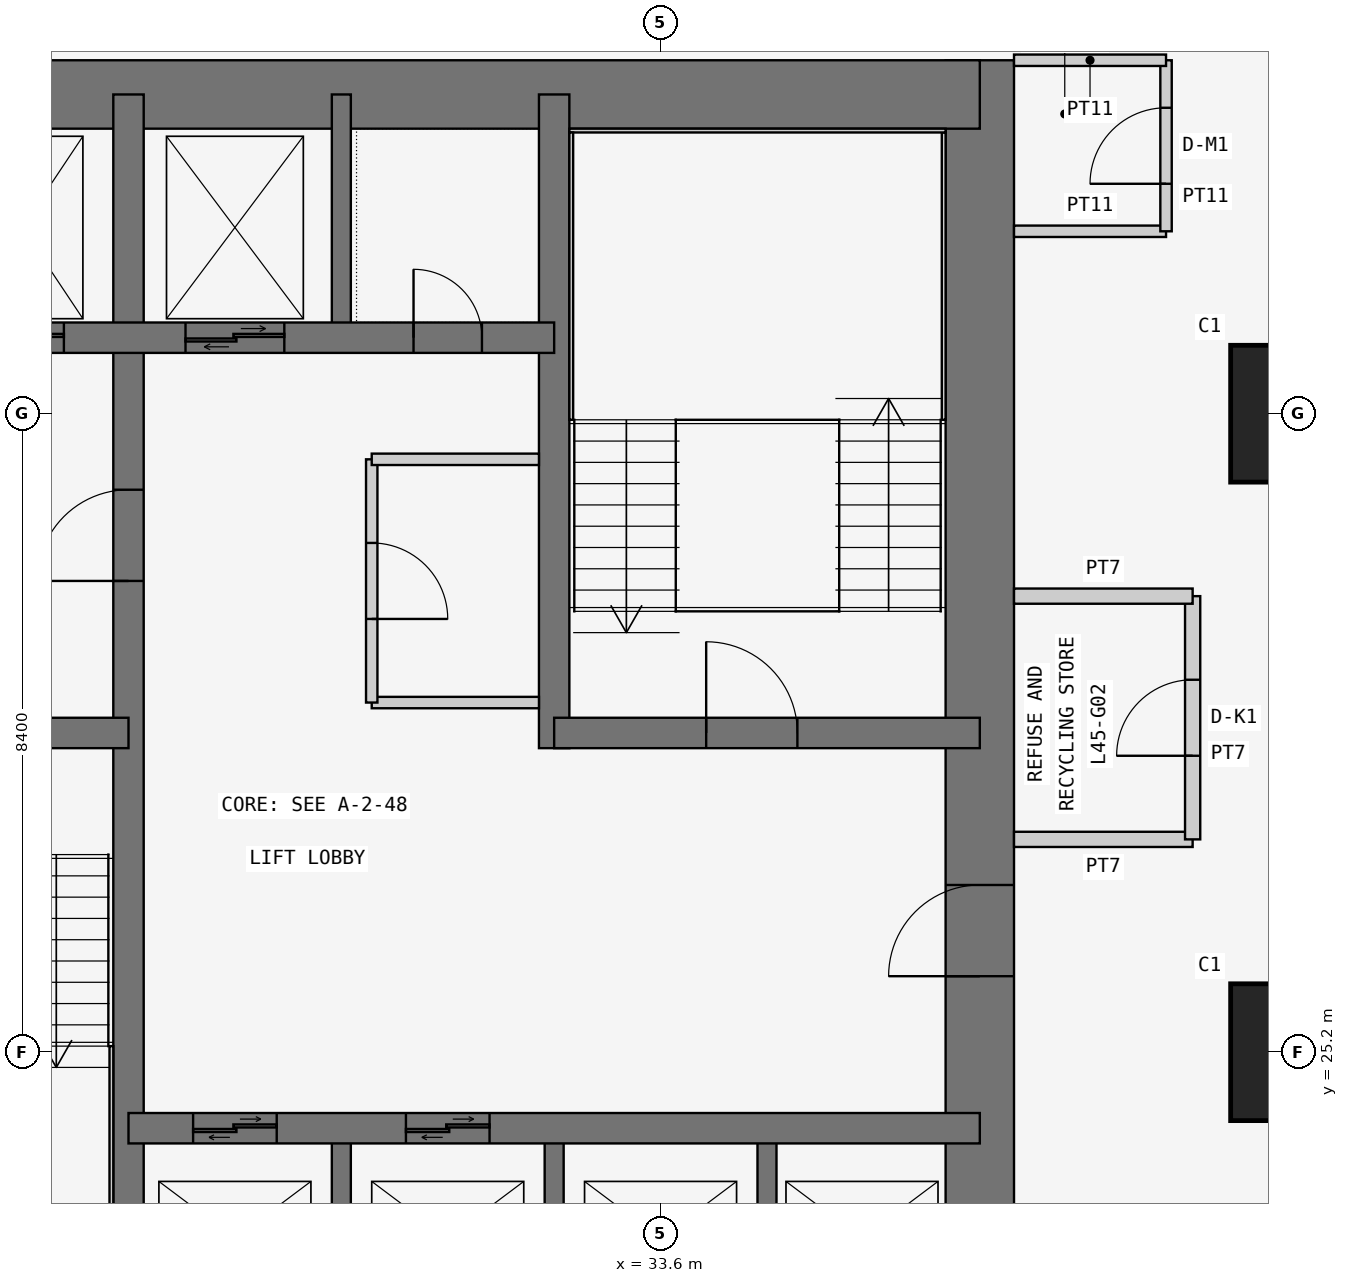
"""IFC4 building model, lengths in metres.
Left out: names, types, materials, properties, quantities, classifications, styles, units other than length and angle.
Written with IfcOpenShell. Run it as: python <this file> out.ifc"""

import sys

from ifc_helpers import new_model, si_unit, direction, frame, frame_2d, origin, origin_2d, place, context, subcontext, project, spatial, rectangle, extrude, element, fill, save


model = new_model("IFC4")
c1 = context("Model", 3, precision=1e-05, world=origin(), true_north=direction((0.0, 1.0)))
c2 = subcontext(c1, "Body", "Model", "MODEL_VIEW")
j1 = project(units=[si_unit("LENGTHUNIT", "METRE"), si_unit("PLANEANGLEUNIT", "RADIAN")], contexts=[c1])
p1 = place(None, origin())
s1 = spatial("IfcSite", under=j1, at=p1, CompositionType="ELEMENT")
p2 = place(p1, origin())
s2 = spatial("IfcBuilding", under=s1, at=p2, CompositionType="ELEMENT")
p3 = place(p2, frame((0.0, 0.0, 173.7)))
s3 = spatial("IfcBuildingStorey", under=s2, at=p3, CompositionType="ELEMENT", Elevation=173.7)
for number, where, z_axis, x_axis in (
    (1, (42.0, 25.2, 0.0), (0.0, 0.0, 1.0), (1.0, 0.0, 0.0)),
    (2, (42.0, 33.6, 0.0), (0.0, 0.0, 1.0), (1.0, 0.0, 0.0)),
):
    element("IfcColumn", number, at=place(p3, frame(where, z_axis=z_axis, x_axis=x_axis)), inside=s3, PredefinedType="COLUMN", context=c2, shape_type="SweptSolid", body=[
        extrude(rectangle(XDim=1.8, YDim=1.8, at=origin_2d()), origin(), (0.0, 0.0, 1.0), 3.6),
    ])
p4 = place(p3, frame((37.8, 21.0, 0.0), z_axis=(0.0, 0.0, 1.0), x_axis=(0.0, 1.0, 0.0)))
e3 = element("IfcWall", 3, at=p4, inside=s3, PredefinedType="SHEAR", context=c2, shape_type="SweptSolid", body=[
    extrude(rectangle(XDim=17.25, YDim=0.9, at=frame_2d((8.625, 0.0))), origin(), (0.0, 0.0, 1.0), 3.6),
])
p5 = place(p4, frame((5.2, 0.0, 0.0)))
e4 = element("IfcOpeningElement", 4, at=p5, cuts=e3, PredefinedType="OPENING", context=c2, shape_type="SweptSolid", body=[
    extrude(rectangle(XDim=1.2, YDim=2.1, at=frame_2d((0.6, 1.05))), frame((0.0, 0.46, 0.0), z_axis=(0.0, -1.0, 0.0), x_axis=(1.0, 0.0, 0.0)), (0.0, 0.0, 1.0), 0.92),
])
p6 = place(p3, frame((37.8, 37.8, 0.0), z_axis=(0.0, 0.0, 1.0), x_axis=(-1.0, 0.0, 0.0)))
e5 = element("IfcWall", 5, at=p6, inside=s3, PredefinedType="SHEAR", context=c2, shape_type="SweptSolid", body=[
    extrude(rectangle(XDim=17.25, YDim=0.9, at=frame_2d((8.625, 0.0))), origin(), (0.0, 0.0, 1.0), 3.6),
])
p7 = place(p3, frame((26.6, 21.0, 0.0), z_axis=(0.0, 0.0, 1.0), x_axis=(0.0, 1.0, 0.0)))
e6 = element("IfcWall", 6, at=p7, inside=s3, PredefinedType="SHEAR", context=c2, shape_type="SweptSolid", body=[
    extrude(rectangle(XDim=16.8, YDim=0.4, at=frame_2d((8.4, 0.0))), origin(), (0.0, 0.0, 1.0), 3.6),
])
p8 = place(p7, frame((10.4, 0.0, 0.0)))
e7 = element("IfcOpeningElement", 7, at=p8, cuts=e6, PredefinedType="OPENING", context=c2, shape_type="SweptSolid", body=[
    extrude(rectangle(XDim=1.2, YDim=2.1, at=frame_2d((0.6, 1.05))), frame((0.0, 0.21, 0.0), z_axis=(0.0, -1.0, 0.0), x_axis=(1.0, 0.0, 0.0)), (0.0, 0.0, 1.0), 0.42),
])
p9 = place(p3, frame((21.0, 29.4, 0.0), z_axis=(0.0, 0.0, 1.0), x_axis=(1.0, 0.0, 0.0)))
e8 = element("IfcWall", 8, at=p9, inside=s3, PredefinedType="SHEAR", context=c2, shape_type="SweptSolid", body=[
    extrude(rectangle(XDim=5.6, YDim=0.4, at=frame_2d((2.8, 0.0))), origin(), (0.0, 0.0, 1.0), 3.6),
])
p10 = place(p9, frame((2.3, 0.0, 0.0)))
e9 = element("IfcOpeningElement", 9, at=p10, cuts=e8, PredefinedType="OPENING", context=c2, shape_type="SweptSolid", body=[
    extrude(rectangle(XDim=1.2, YDim=2.1, at=frame_2d((0.6, 1.05))), frame((0.0, 0.21, 0.0), z_axis=(0.0, -1.0, 0.0), x_axis=(1.0, 0.0, 0.0)), (0.0, 0.0, 1.0), 0.42),
])
p11 = place(p3, frame((21.0, 34.6, 0.0), z_axis=(0.0, 0.0, 1.0), x_axis=(1.0, 0.0, 0.0)))
e10 = element("IfcWall", 10, at=p11, inside=s3, PredefinedType="SHEAR", context=c2, shape_type="SweptSolid", body=[
    extrude(rectangle(XDim=11.2, YDim=0.4, at=frame_2d((5.6, 0.0))), origin(), (0.0, 0.0, 1.0), 3.6),
])
p12 = place(p11, frame((9.35, 0.0, 0.0)))
e11 = element("IfcOpeningElement", 11, at=p12, cuts=e10, PredefinedType="OPENING", context=c2, shape_type="SweptSolid", body=[
    extrude(rectangle(XDim=0.9, YDim=2.1, at=frame_2d((0.45, 1.05))), frame((0.0, 0.21, 0.0), z_axis=(0.0, -1.0, 0.0), x_axis=(1.0, 0.0, 0.0)), (0.0, 0.0, 1.0), 0.42),
])
p13 = place(p11, frame((1.0, 0.0, 0.0)))
e12 = element("IfcOpeningElement", 12, at=p13, cuts=e10, PredefinedType="OPENING", context=c2, shape_type="SweptSolid", body=[
    extrude(rectangle(XDim=1.1, YDim=2.1, at=frame_2d((0.55, 1.05))), frame((0.0, 0.21, 0.0), z_axis=(0.0, -1.0, 0.0), x_axis=(1.0, 0.0, 0.0)), (0.0, 0.0, 1.0), 0.42),
])
p14 = place(p11, frame((3.65, 0.0, 0.0)))
e13 = element("IfcOpeningElement", 13, at=p14, cuts=e10, PredefinedType="OPENING", context=c2, shape_type="SweptSolid", body=[
    extrude(rectangle(XDim=1.1, YDim=2.1, at=frame_2d((0.55, 1.05))), frame((0.0, 0.21, 0.0), z_axis=(0.0, -1.0, 0.0), x_axis=(1.0, 0.0, 0.0)), (0.0, 0.0, 1.0), 0.42),
])
p15 = place(p11, frame((6.35, 0.0, 0.0)))
e14 = element("IfcOpeningElement", 14, at=p15, cuts=e10, PredefinedType="OPENING", context=c2, shape_type="SweptSolid", body=[
    extrude(rectangle(XDim=1.3, YDim=2.1, at=frame_2d((0.65, 1.05))), frame((0.0, 0.21, 0.0), z_axis=(0.0, -1.0, 0.0), x_axis=(1.0, 0.0, 0.0)), (0.0, 0.0, 1.0), 0.42),
])
p16 = place(p3, frame((26.6, 24.2, 0.0), z_axis=(0.0, 0.0, 1.0), x_axis=(1.0, 0.0, 0.0)))
e15 = element("IfcWall", 15, at=p16, inside=s3, PredefinedType="SHEAR", context=c2, shape_type="SweptSolid", body=[
    extrude(rectangle(XDim=11.2, YDim=0.4, at=frame_2d((5.6, 0.0))), origin(), (0.0, 0.0, 1.0), 3.6),
])
p17 = place(p16, frame((0.85, 0.0, 0.0)))
e16 = element("IfcOpeningElement", 16, at=p17, cuts=e15, PredefinedType="OPENING", context=c2, shape_type="SweptSolid", body=[
    extrude(rectangle(XDim=1.1, YDim=2.1, at=frame_2d((0.55, 1.05))), frame((0.0, 0.21, 0.0), z_axis=(0.0, -1.0, 0.0), x_axis=(1.0, 0.0, 0.0)), (0.0, 0.0, 1.0), 0.42),
])
p18 = place(p16, frame((3.65, 0.0, 0.0)))
e17 = element("IfcOpeningElement", 17, at=p18, cuts=e15, PredefinedType="OPENING", context=c2, shape_type="SweptSolid", body=[
    extrude(rectangle(XDim=1.1, YDim=2.1, at=frame_2d((0.55, 1.05))), frame((0.0, 0.21, 0.0), z_axis=(0.0, -1.0, 0.0), x_axis=(1.0, 0.0, 0.0)), (0.0, 0.0, 1.0), 0.42),
])
p19 = place(p3, frame((32.2, 29.2, 0.0), z_axis=(0.0, 0.0, 1.0), x_axis=(0.0, 1.0, 0.0)))
e18 = element("IfcWall", 18, at=p19, inside=s3, PredefinedType="SHEAR", context=c2, shape_type="SweptSolid", body=[
    extrude(rectangle(XDim=8.6, YDim=0.4, at=frame_2d((4.3, 0.0))), origin(), (0.0, 0.0, 1.0), 3.6),
])
p20 = place(p3, frame((32.2, 29.4, 0.0), z_axis=(0.0, 0.0, 1.0), x_axis=(1.0, 0.0, 0.0)))
e19 = element("IfcWall", 19, at=p20, inside=s3, PredefinedType="SHEAR", context=c2, shape_type="SweptSolid", body=[
    extrude(rectangle(XDim=5.6, YDim=0.4, at=frame_2d((2.8, 0.0))), origin(), (0.0, 0.0, 1.0), 3.6),
])
p21 = place(p20, frame((2.0, 0.0, 0.0)))
e20 = element("IfcOpeningElement", 20, at=p21, cuts=e19, PredefinedType="OPENING", context=c2, shape_type="SweptSolid", body=[
    extrude(rectangle(XDim=1.2, YDim=2.1, at=frame_2d((0.6, 1.05))), frame((0.0, 0.21, 0.0), z_axis=(0.0, -1.0, 0.0), x_axis=(1.0, 0.0, 0.0)), (0.0, 0.0, 1.0), 0.42),
])
for number, where, z_axis, x_axis in (
    (21, (29.4, 21.0, 0.0), (0.0, 0.0, 1.0), (0.0, 1.0, 0.0)),
    (22, (32.2, 21.0, 0.0), (0.0, 0.0, 1.0), (0.0, 1.0, 0.0)),
    (23, (35.0, 21.0, 0.0), (0.0, 0.0, 1.0), (0.0, 1.0, 0.0)),
    (24, (29.4, 34.6, 0.0), (0.0, 0.0, 1.0), (0.0, 1.0, 0.0)),
):
    element("IfcWall", number, at=place(p3, frame(where, z_axis=z_axis, x_axis=x_axis)), inside=s3, PredefinedType="SHEAR", context=c2, shape_type="SweptSolid", body=[
        extrude(rectangle(XDim=3.2, YDim=0.25, at=frame_2d((1.6, 0.0))), origin(), (0.0, 0.0, 1.0), 3.6),
    ])
p22 = place(p3, frame((38.25, 28.0, 0.0), z_axis=(0.0, 0.0, 1.0), x_axis=(1.0, 0.0, 0.0)))
e25 = element("IfcWall", 25, at=p22, inside=s3, PredefinedType="PARTITIONING", context=c2, shape_type="SweptSolid", body=[
    extrude(rectangle(XDim=2.35, YDim=0.2, at=frame_2d((1.175, 0.0))), origin(), (0.0, 0.0, 1.0), 3.35),
])
p23 = place(p3, frame((40.6, 28.0, 0.0), z_axis=(0.0, 0.0, 1.0), x_axis=(0.0, 1.0, 0.0)))
e26 = element("IfcWall", 26, at=p23, inside=s3, PredefinedType="PARTITIONING", context=c2, shape_type="SweptSolid", body=[
    extrude(rectangle(XDim=3.2, YDim=0.2, at=frame_2d((1.6, 0.0))), origin(), (0.0, 0.0, 1.0), 3.35),
])
p24 = place(p23, frame((1.1, 0.0, 0.0)))
e27 = element("IfcOpeningElement", 27, at=p24, cuts=e26, PredefinedType="OPENING", context=c2, shape_type="SweptSolid", body=[
    extrude(rectangle(XDim=1.0, YDim=2.1, at=frame_2d((0.5, 1.05))), frame((0.0, 0.11, 0.0), z_axis=(0.0, -1.0, 0.0), x_axis=(1.0, 0.0, 0.0)), (0.0, 0.0, 1.0), 0.22),
])
p25 = place(p3, frame((40.6, 31.2, 0.0), z_axis=(0.0, 0.0, 1.0), x_axis=(-1.0, 0.0, 0.0)))
e28 = element("IfcWall", 28, at=p25, inside=s3, PredefinedType="PARTITIONING", context=c2, shape_type="SweptSolid", body=[
    extrude(rectangle(XDim=2.35, YDim=0.2, at=frame_2d((1.175, 0.0))), origin(), (0.0, 0.0, 1.0), 3.35),
])
p26 = place(p3, frame((38.25, 36.0, 0.0), z_axis=(0.0, 0.0, 1.0), x_axis=(1.0, 0.0, 0.0)))
e29 = element("IfcWall", 29, at=p26, inside=s3, PredefinedType="PARTITIONING", context=c2, shape_type="SweptSolid", body=[
    extrude(rectangle(XDim=2.0, YDim=0.15, at=frame_2d((1.0, 0.0))), origin(), (0.0, 0.0, 1.0), 3.35),
])
p27 = place(p3, frame((40.25, 36.0, 0.0), z_axis=(0.0, 0.0, 1.0), x_axis=(0.0, 1.0, 0.0)))
e30 = element("IfcWall", 30, at=p27, inside=s3, PredefinedType="PARTITIONING", context=c2, shape_type="SweptSolid", body=[
    extrude(rectangle(XDim=2.25, YDim=0.15, at=frame_2d((1.125, 0.0))), origin(), (0.0, 0.0, 1.0), 3.35),
])
p28 = place(p27, frame((0.625, 0.0, 0.0)))
e31 = element("IfcOpeningElement", 31, at=p28, cuts=e30, PredefinedType="OPENING", context=c2, shape_type="SweptSolid", body=[
    extrude(rectangle(XDim=1.0, YDim=2.1, at=frame_2d((0.5, 1.05))), frame((0.0, 0.085, 0.0), z_axis=(0.0, -1.0, 0.0), x_axis=(1.0, 0.0, 0.0)), (0.0, 0.0, 1.0), 0.17),
])
p29 = place(p3, frame((40.25, 38.25, 0.0), z_axis=(0.0, 0.0, 1.0), x_axis=(-1.0, 0.0, 0.0)))
e32 = element("IfcWall", 32, at=p29, inside=s3, PredefinedType="PARTITIONING", context=c2, shape_type="SweptSolid", body=[
    extrude(rectangle(XDim=2.0, YDim=0.15, at=frame_2d((1.0, 0.0))), origin(), (0.0, 0.0, 1.0), 3.35),
])
p30 = place(p3, frame((32.0, 29.8, 0.0), z_axis=(0.0, 0.0, 1.0), x_axis=(-1.0, 0.0, 0.0)))
e33 = element("IfcWall", 33, at=p30, inside=s3, PredefinedType="PARTITIONING", context=c2, shape_type="SweptSolid", body=[
    extrude(rectangle(XDim=2.2, YDim=0.15, at=frame_2d((1.1, 0.0))), origin(), (0.0, 0.0, 1.0), 3.35),
])
p31 = place(p3, frame((29.8, 29.8, 0.0), z_axis=(0.0, 0.0, 1.0), x_axis=(0.0, 1.0, 0.0)))
e34 = element("IfcWall", 34, at=p31, inside=s3, PredefinedType="PARTITIONING", context=c2, shape_type="SweptSolid", body=[
    extrude(rectangle(XDim=3.2, YDim=0.15, at=frame_2d((1.6, 0.0))), origin(), (0.0, 0.0, 1.0), 3.35),
])
p32 = place(p31, frame((1.1, 0.0, 0.0)))
e35 = element("IfcOpeningElement", 35, at=p32, cuts=e34, PredefinedType="OPENING", context=c2, shape_type="SweptSolid", body=[
    extrude(rectangle(XDim=1.0, YDim=2.1, at=frame_2d((0.5, 1.05))), frame((0.0, 0.085, 0.0), z_axis=(0.0, -1.0, 0.0), x_axis=(1.0, 0.0, 0.0)), (0.0, 0.0, 1.0), 0.17),
])
p33 = place(p3, frame((29.8, 33.0, 0.0), z_axis=(0.0, 0.0, 1.0), x_axis=(1.0, 0.0, 0.0)))
e36 = element("IfcWall", 36, at=p33, inside=s3, PredefinedType="PARTITIONING", context=c2, shape_type="SweptSolid", body=[
    extrude(rectangle(XDim=2.2, YDim=0.15, at=frame_2d((1.1, 0.0))), origin(), (0.0, 0.0, 1.0), 3.35),
])
p34 = place(p3, frame((26.375, 25.28, 1.8), z_axis=(0.0, 0.0, 1.0), x_axis=(0.0, -1.0, 0.0)))
e37 = element("IfcWall", 37, at=p34, inside=s3, PredefinedType="PARTITIONING", context=c2, shape_type="SweptSolid", body=[
    extrude(rectangle(XDim=3.78, YDim=0.05, at=frame_2d((1.89, 0.0))), origin(), (0.0, 0.0, 1.0), 1.8),
])
p35 = place(p3, frame((32.4, 37.325, 1.8), z_axis=(0.0, 0.0, 1.0), x_axis=(1.0, 0.0, 0.0)))
e38 = element("IfcWall", 38, at=p35, inside=s3, PredefinedType="PARTITIONING", context=c2, shape_type="SweptSolid", body=[
    extrude(rectangle(XDim=4.95, YDim=0.05, at=frame_2d((2.475, 0.0))), origin(), (0.0, 0.0, 1.0), 1.8),
])
for number, where, z_axis, x_axis in (
    (39, (32.425, 33.52, 1.8), (0.0, 0.0, 1.0), (0.0, 1.0, 0.0)),
    (40, (37.325, 33.52, 1.8), (0.0, 0.0, 1.0), (0.0, 1.0, 0.0)),
):
    element("IfcWall", number, at=place(p3, frame(where, z_axis=z_axis, x_axis=x_axis)), inside=s3, PredefinedType="PARTITIONING", context=c2, shape_type="SweptSolid", body=[
        extrude(rectangle(XDim=3.78, YDim=0.05, at=frame_2d((1.89, 0.0))), origin(), (0.0, 0.0, 1.0), 1.8),
    ])
p36 = place(p24, origin())
e41 = element("IfcDoor", 41, at=p36, inside=s3, OperationType="SINGLE_SWING_LEFT", PredefinedType="DOOR", context=c2, shape_type="SweptSolid", body=[
    extrude(rectangle(XDim=1.0, YDim=2.1, at=frame_2d((0.5, 1.05))), frame((0.0, 0.025, 0.0), z_axis=(0.0, -1.0, 0.0), x_axis=(1.0, 0.0, 0.0)), (0.0, 0.0, 1.0), 0.05),
])
fill(e27, e41)
p37 = place(p28, origin())
e42 = element("IfcDoor", 42, at=p37, inside=s3, OperationType="SINGLE_SWING_LEFT", PredefinedType="DOOR", context=c2, shape_type="SweptSolid", body=[
    extrude(rectangle(XDim=1.0, YDim=2.1, at=frame_2d((0.5, 1.05))), frame((0.0, 0.025, 0.0), z_axis=(0.0, -1.0, 0.0), x_axis=(1.0, 0.0, 0.0)), (0.0, 0.0, 1.0), 0.05),
])
fill(e31, e42)
p38 = place(p8, origin())
e43 = element("IfcDoor", 43, at=p38, inside=s3, OperationType="SINGLE_SWING_LEFT", PredefinedType="DOOR", context=c2, shape_type="SweptSolid", body=[
    extrude(rectangle(XDim=1.2, YDim=2.1, at=frame_2d((0.6, 1.05))), frame((0.0, 0.025, 0.0), z_axis=(0.0, -1.0, 0.0), x_axis=(1.0, 0.0, 0.0)), (0.0, 0.0, 1.0), 0.05),
])
fill(e7, e43)
p39 = place(p5, origin())
e44 = element("IfcDoor", 44, at=p39, inside=s3, OperationType="SINGLE_SWING_LEFT", PredefinedType="DOOR", context=c2, shape_type="SweptSolid", body=[
    extrude(rectangle(XDim=1.2, YDim=2.1, at=frame_2d((0.6, 1.05))), frame((0.0, 0.025, 0.0), z_axis=(0.0, -1.0, 0.0), x_axis=(1.0, 0.0, 0.0)), (0.0, 0.0, 1.0), 0.05),
])
fill(e4, e44)
p40 = place(p21, origin())
e45 = element("IfcDoor", 45, at=p40, inside=s3, OperationType="SINGLE_SWING_LEFT", PredefinedType="DOOR", context=c2, shape_type="SweptSolid", body=[
    extrude(rectangle(XDim=1.2, YDim=2.1, at=frame_2d((0.6, 1.05))), frame((0.0, 0.025, 0.0), z_axis=(0.0, -1.0, 0.0), x_axis=(1.0, 0.0, 0.0)), (0.0, 0.0, 1.0), 0.05),
])
fill(e20, e45)
p41 = place(p12, origin())
e46 = element("IfcDoor", 46, at=p41, inside=s3, OperationType="SINGLE_SWING_LEFT", PredefinedType="DOOR", context=c2, shape_type="SweptSolid", body=[
    extrude(rectangle(XDim=0.9, YDim=2.1, at=frame_2d((0.45, 1.05))), frame((0.0, 0.025, 0.0), z_axis=(0.0, -1.0, 0.0), x_axis=(1.0, 0.0, 0.0)), (0.0, 0.0, 1.0), 0.05),
])
fill(e11, e46)
p42 = place(p32, frame((1.0, 0.0, 0.0), z_axis=(0.0, 0.0, 1.0), x_axis=(-1.0, 0.0, 0.0)))
e47 = element("IfcDoor", 47, at=p42, inside=s3, OperationType="SINGLE_SWING_RIGHT", PredefinedType="DOOR", context=c2, shape_type="SweptSolid", body=[
    extrude(rectangle(XDim=1.0, YDim=2.1, at=frame_2d((0.5, 1.05))), frame((0.0, 0.025, 0.0), z_axis=(0.0, -1.0, 0.0), x_axis=(1.0, 0.0, 0.0)), (0.0, 0.0, 1.0), 0.05),
])
fill(e35, e47)
p43 = place(p17, origin())
e48 = element("IfcDoor", 48, at=p43, inside=s3, OperationType="DOUBLE_DOOR_SLIDING", PredefinedType="DOOR", context=c2, shape_type="SweptSolid", body=[
    extrude(rectangle(XDim=1.1, YDim=2.1, at=frame_2d((0.55, 1.05))), frame((0.0, 0.025, 0.0), z_axis=(0.0, -1.0, 0.0), x_axis=(1.0, 0.0, 0.0)), (0.0, 0.0, 1.0), 0.05),
])
fill(e16, e48)
p44 = place(p18, origin())
e49 = element("IfcDoor", 49, at=p44, inside=s3, OperationType="DOUBLE_DOOR_SLIDING", PredefinedType="DOOR", context=c2, shape_type="SweptSolid", body=[
    extrude(rectangle(XDim=1.1, YDim=2.1, at=frame_2d((0.55, 1.05))), frame((0.0, 0.025, 0.0), z_axis=(0.0, -1.0, 0.0), x_axis=(1.0, 0.0, 0.0)), (0.0, 0.0, 1.0), 0.05),
])
fill(e17, e49)
p45 = place(p14, origin())
e50 = element("IfcDoor", 50, at=p45, inside=s3, OperationType="DOUBLE_DOOR_SLIDING", PredefinedType="DOOR", context=c2, shape_type="SweptSolid", body=[
    extrude(rectangle(XDim=1.1, YDim=2.1, at=frame_2d((0.55, 1.05))), frame((0.0, 0.025, 0.0), z_axis=(0.0, -1.0, 0.0), x_axis=(1.0, 0.0, 0.0)), (0.0, 0.0, 1.0), 0.05),
])
fill(e13, e50)
p46 = place(p15, origin())
e51 = element("IfcDoor", 51, at=p46, inside=s3, OperationType="DOUBLE_DOOR_SLIDING", PredefinedType="DOOR", context=c2, shape_type="SweptSolid", body=[
    extrude(rectangle(XDim=1.3, YDim=2.1, at=frame_2d((0.65, 1.05))), frame((0.0, 0.025, 0.0), z_axis=(0.0, -1.0, 0.0), x_axis=(1.0, 0.0, 0.0)), (0.0, 0.0, 1.0), 0.05),
])
fill(e14, e51)
save(model, sys.argv[1])
